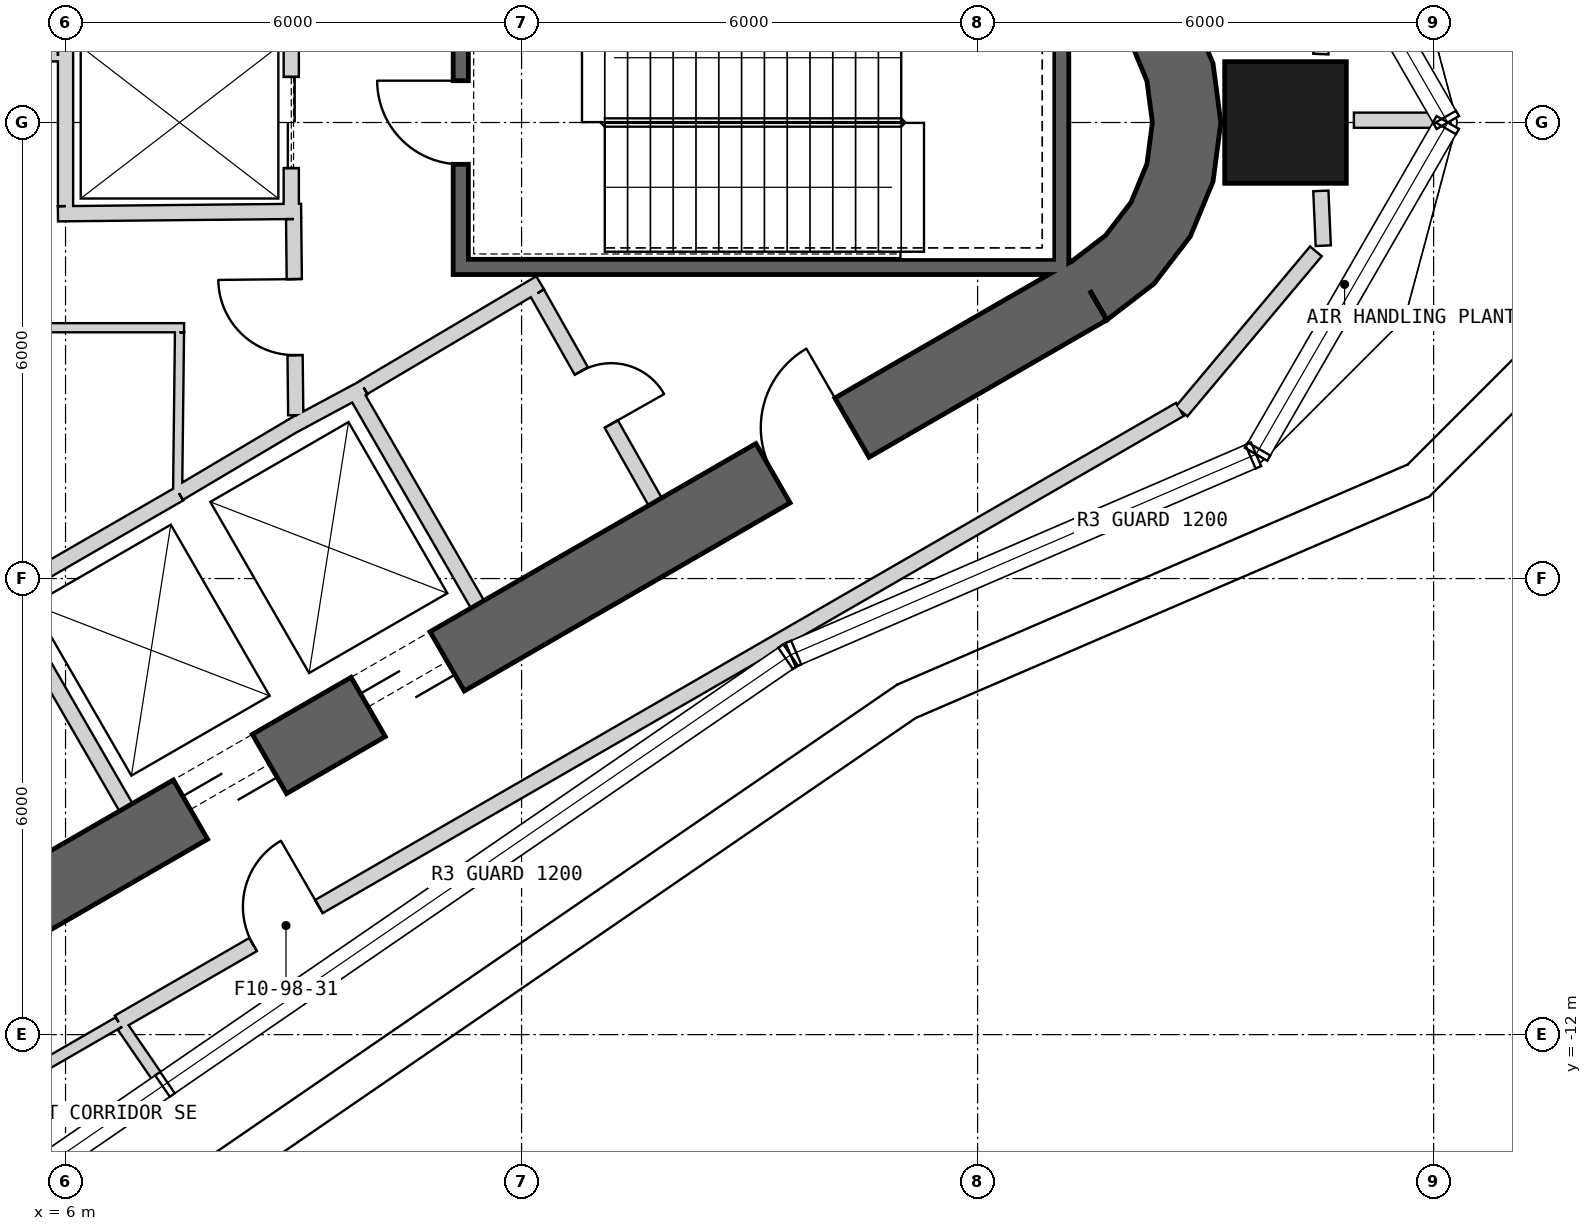
"""IFC4 building model, lengths in metres.
Left out: names, types, materials, properties, quantities, classifications, styles, units other than length and angle.
Written with IfcOpenShell. Run it as: python <this file> out.ifc"""

import sys

from ifc_helpers import new_model, si_unit, direction, frame, frame_2d, origin, origin_2d, place, context, subcontext, project, spatial, polyline, rectangle, outline, extrude, element, fill, save


model = new_model("IFC4")
c1 = context("Model", 3, precision=1e-05, world=origin(), true_north=direction((0.0, 1.0)))
c2 = subcontext(c1, "Body", "Model", "MODEL_VIEW")
j1 = project(units=[si_unit("LENGTHUNIT", "METRE"), si_unit("PLANEANGLEUNIT", "RADIAN")], contexts=[c1])
p1 = place(None, origin())
s1 = spatial("IfcSite", under=j1, at=p1, CompositionType="ELEMENT")
p2 = place(p1, origin())
s2 = spatial("IfcBuilding", under=s1, at=p2, CompositionType="ELEMENT")
p3 = place(p2, frame((0.0, 0.0, 435.3)))
s3 = spatial("IfcBuildingStorey", under=s2, at=p3, CompositionType="ELEMENT", Elevation=435.3)
p4 = place(p3, frame((22.051, 0.0, 0.0), z_axis=(0.0, 0.0, 1.0), x_axis=(1.0, 0.0, 0.0)))
e1 = element("IfcColumn", 1, at=p4, inside=s3, PredefinedType="COLUMN", context=c2, shape_type="SweptSolid", body=[
    extrude(rectangle(XDim=1.6, YDim=1.6, at=origin_2d()), origin(), (0.0, 0.0, 1.0), 5.0),
])
p5 = place(p3, frame((-7.825, -17.97, 0.0), z_axis=(0.0, 0.0, 1.0), x_axis=(0.866028369851, 0.499994862586, 0.0)))
e2 = element("IfcWall", 2, at=p5, inside=s3, PredefinedType="SHEAR", context=c2, shape_type="SweptSolid", body=[
    extrude(rectangle(XDim=31.523, YDim=0.9, at=frame_2d((15.762, 0.0))), origin(), (0.0, 0.0, 1.0), 5.0),
])
p6 = place(p5, frame((17.862, 0.0, 0.0)))
e3 = element("IfcOpeningElement", 3, at=p6, cuts=e2, PredefinedType="OPENING", context=c2, shape_type="SweptSolid", body=[
    extrude(rectangle(XDim=1.2, YDim=2.4, at=frame_2d((0.6, 1.2))), frame((0.0, 0.46, 0.0), z_axis=(0.0, -1.0, 0.0), x_axis=(1.0, 0.0, 0.0)), (0.0, 0.0, 1.0), 0.92),
])
p7 = place(p5, frame((20.562, 0.0, 0.0)))
e4 = element("IfcOpeningElement", 4, at=p7, cuts=e2, PredefinedType="OPENING", context=c2, shape_type="SweptSolid", body=[
    extrude(rectangle(XDim=1.2, YDim=2.4, at=frame_2d((0.6, 1.2))), frame((0.0, 0.46, 0.0), z_axis=(0.0, -1.0, 0.0), x_axis=(1.0, 0.0, 0.0)), (0.0, 0.0, 1.0), 0.92),
])
p8 = place(p5, frame((26.712, 0.0, 0.0)))
e5 = element("IfcOpeningElement", 5, at=p8, cuts=e2, PredefinedType="OPENING", context=c2, shape_type="SweptSolid", body=[
    extrude(rectangle(XDim=1.2, YDim=2.4, at=frame_2d((0.6, 1.2))), frame((0.0, 0.46, 0.0), z_axis=(0.0, -1.0, 0.0), x_axis=(1.0, 0.0, 0.0)), (0.0, 0.0, 1.0), 0.92),
])
p9 = place(p5, frame((3.612, 0.0, 0.0)))
e6 = element("IfcOpeningElement", 6, at=p9, cuts=e2, PredefinedType="OPENING", context=c2, shape_type="SweptSolid", body=[
    extrude(rectangle(XDim=1.2, YDim=2.4, at=frame_2d((0.6, 1.2))), frame((0.0, 0.46, 0.0), z_axis=(0.0, -1.0, 0.0), x_axis=(1.0, 0.0, 0.0)), (0.0, 0.0, 1.0), 0.92),
])
p10 = place(p3, origin())
e7 = element("IfcWall", 7, at=p10, inside=s3, PredefinedType="SHEAR", context=c2, shape_type="SweptSolid", body=[
    extrude(outline(polyline([(19.7, -2.598), (20.321, -2.121), (20.798, -1.5), (21.098, -0.777), (21.2, 0.0), (21.098, 0.777), (20.798, 1.5), (20.321, 2.121), (19.7, 2.598), (19.25, 1.819), (19.685, 1.485), (20.019, 1.05), (20.229, 0.543), (20.3, 0.0), (20.229, -0.543), (20.019, -1.05), (19.685, -1.485), (19.25, -1.819), (19.7, -2.598)])), origin(), (0.0, 0.0, 1.0), 5.0),
])
p11 = place(p3, frame((6.795, -9.01, 0.0), z_axis=(0.0, 0.0, 1.0), x_axis=(-0.499984717929, 0.866034226713, 0.0)))
e8 = element("IfcWall", 8, at=p11, inside=s3, PredefinedType="PLUMBINGWALL", context=c2, shape_type="SweptSolid", body=[
    extrude(rectangle(XDim=3.25, YDim=0.2, at=frame_2d((1.625, 0.0))), origin(), (0.0, 0.0, 1.0), 4.75),
])
p12 = place(p3, frame((5.159, -6.236, 0.0), z_axis=(0.0, 0.0, 1.0), x_axis=(0.866036505625, 0.499980770555, 0.0)))
e9 = element("IfcWall", 9, at=p12, inside=s3, PredefinedType="PLUMBINGWALL", context=c2, shape_type="SweptSolid", body=[
    extrude(rectangle(XDim=2.7, YDim=0.2, at=frame_2d((1.35, 0.0))), origin(), (0.0, 0.0, 1.0), 4.75),
])
p13 = place(p3, frame((9.795, -3.525, 0.0), z_axis=(0.0, 0.0, 1.0), x_axis=(0.499984717929, -0.866034226713, 0.0)))
e10 = element("IfcWall", 10, at=p13, inside=s3, PredefinedType="PLUMBINGWALL", context=c2, shape_type="SweptSolid", body=[
    extrude(rectangle(XDim=3.25, YDim=0.2, at=frame_2d((1.625, 0.0))), origin(), (0.0, 0.0, 1.0), 4.75),
])
p14 = place(p3, frame((8.974, -3.999, 0.0), z_axis=(0.0, 0.0, 1.0), x_axis=(0.880907015104, 0.473289373154, 0.0)))
e11 = element("IfcWall", 11, at=p14, inside=s3, PredefinedType="PLUMBINGWALL", context=c2, shape_type="SweptSolid", body=[
    extrude(rectangle(XDim=1.078, YDim=0.2, at=frame_2d((0.539, 0.0))), origin(), (0.0, 0.0, 1.0), 4.75),
])
p15 = place(p3, frame((7.493, -4.878, 0.0), z_axis=(0.0, 0.0, 1.0), x_axis=(0.859981807212, 0.510324691999, 0.0)))
e12 = element("IfcWall", 12, at=p15, inside=s3, PredefinedType="PLUMBINGWALL", context=c2, shape_type="SweptSolid", body=[
    extrude(rectangle(XDim=1.845, YDim=0.2, at=frame_2d((0.922, 0.0))), origin(), (0.0, 0.0, 1.0), 4.75),
])
p16 = place(p3, frame((19.1, -2.0, -0.25), z_axis=(0.0, 0.0, 1.0), x_axis=(0.0, 1.0, 0.0)))
e13 = element("IfcWall", 13, at=p16, inside=s3, PredefinedType="SHEAR", context=c2, shape_type="SweptSolid", body=[
    extrude(rectangle(XDim=3.8, YDim=0.2, at=frame_2d((1.9, 0.0))), origin(), (0.0, 0.0, 1.0), 5.0),
])
p17 = place(p3, frame((11.1, -1.9, -0.25), z_axis=(0.0, 0.0, 1.0), x_axis=(1.0, 0.0, 0.0)))
e14 = element("IfcWall", 14, at=p17, inside=s3, PredefinedType="SHEAR", context=c2, shape_type="SweptSolid", body=[
    extrude(rectangle(XDim=7.9, YDim=0.2, at=frame_2d((3.95, 0.0))), origin(), (0.0, 0.0, 1.0), 5.0),
])
p18 = place(p3, frame((11.2, -1.8, -0.25), z_axis=(0.0, 0.0, 1.0), x_axis=(0.0, 1.0, 0.0)))
e15 = element("IfcWall", 15, at=p18, inside=s3, PredefinedType="SHEAR", context=c2, shape_type="SweptSolid", body=[
    extrude(rectangle(XDim=3.6, YDim=0.2, at=frame_2d((1.8, 0.0))), origin(), (0.0, 0.0, 1.0), 5.0),
])
p19 = place(p18, frame((1.25, 0.0, 0.25)))
e16 = element("IfcOpeningElement", 16, at=p19, cuts=e15, PredefinedType="OPENING", context=c2, shape_type="SweptSolid", body=[
    extrude(rectangle(XDim=1.1, YDim=2.1, at=frame_2d((0.55, 1.05))), frame((0.0, 0.11, 0.0), z_axis=(0.0, -1.0, 0.0), x_axis=(1.0, 0.0, 0.0)), (0.0, 0.0, 1.0), 0.22),
])
p20 = place(p3, frame((8.97, 1.2, 0.0), z_axis=(0.0, 0.0, 1.0), x_axis=(0.0, -1.0, 0.0)))
e17 = element("IfcWall", 17, at=p20, inside=s3, PredefinedType="PLUMBINGWALL", context=c2, shape_type="SweptSolid", body=[
    extrude(rectangle(XDim=2.4, YDim=0.2, at=frame_2d((1.2, 0.0))), origin(), (0.0, 0.0, 1.0), 4.75),
])
p21 = place(p20, frame((0.6, 0.0, 0.0)))
e18 = element("IfcOpeningElement", 18, at=p21, cuts=e17, PredefinedType="OPENING", context=c2, shape_type="SweptSolid", body=[
    extrude(rectangle(XDim=1.2, YDim=2.4, at=frame_2d((0.6, 1.2))), frame((0.0, 0.11, 0.0), z_axis=(0.0, -1.0, 0.0), x_axis=(1.0, 0.0, 0.0)), (0.0, 0.0, 1.0), 0.22),
])
p22 = place(p3, frame((6.0, -1.1, 0.0), z_axis=(0.0, 0.0, 1.0), x_axis=(0.0, 1.0, 0.0)))
e19 = element("IfcWall", 19, at=p22, inside=s3, PredefinedType="PLUMBINGWALL", context=c2, shape_type="SweptSolid", body=[
    extrude(rectangle(XDim=2.2, YDim=0.2, at=frame_2d((1.1, 0.0))), origin(), (0.0, 0.0, 1.0), 4.75),
])
p23 = place(p3, frame((5.9, -1.201, 0.0), z_axis=(0.0, 0.0, 1.0), x_axis=(0.999950064753, 0.009993397809, 0.0)))
e20 = element("IfcWall", 20, at=p23, inside=s3, PredefinedType="PLUMBINGWALL", context=c2, shape_type="SweptSolid", body=[
    extrude(rectangle(XDim=3.2, YDim=0.2, at=frame_2d((1.6, 0.0))), origin(), (0.0, 0.0, 1.0), 4.75),
])
p24 = place(p3, frame((12.245, -2.109, 0.0), z_axis=(0.0, 0.0, 1.0), x_axis=(-0.860414880418, -0.509594185166, 0.0)))
e21 = element("IfcWall", 21, at=p24, inside=s3, PredefinedType="PARTITIONING", context=c2, shape_type="SweptSolid", body=[
    extrude(rectangle(XDim=2.7, YDim=0.2, at=frame_2d((1.35, 0.0))), origin(), (0.0, 0.0, 1.0), 4.75),
])
p25 = place(p3, frame((13.758, -4.99, 0.0), z_axis=(0.0, 0.0, 1.0), x_axis=(-0.491993409184, 0.87059892334, 0.0)))
e22 = element("IfcWall", 22, at=p25, inside=s3, PredefinedType="PARTITIONING", context=c2, shape_type="SweptSolid", body=[
    extrude(rectangle(XDim=3.15, YDim=0.2, at=frame_2d((1.575, 0.0))), origin(), (0.0, 0.0, 1.0), 4.75),
])
p26 = place(p25, frame((1.175, 0.0, 0.0)))
e23 = element("IfcOpeningElement", 23, at=p26, cuts=e22, PredefinedType="OPENING", context=c2, shape_type="SweptSolid", body=[
    extrude(rectangle(XDim=0.8, YDim=2.1, at=frame_2d((0.4, 1.05))), frame((0.0, 0.11, 0.0), z_axis=(0.0, -1.0, 0.0), x_axis=(1.0, 0.0, 0.0)), (0.0, 0.0, 1.0), 0.22),
])
p27 = place(p3, frame((9.029, -3.851, 0.0), z_axis=(0.0, 0.0, 1.0), x_axis=(-0.010783593937, 0.99994185536, 0.0)))
e24 = element("IfcWall", 24, at=p27, inside=s3, PredefinedType="PARTITIONING", context=c2, shape_type="SweptSolid", body=[
    extrude(rectangle(XDim=2.581, YDim=0.2, at=frame_2d((1.291, 0.0))), origin(), (0.0, 0.0, 1.0), 4.75),
])
p28 = place(p27, frame((0.791, 0.0, 0.0)))
e25 = element("IfcOpeningElement", 25, at=p28, cuts=e24, PredefinedType="OPENING", context=c2, shape_type="SweptSolid", body=[
    extrude(rectangle(XDim=1.0, YDim=2.1, at=frame_2d((0.5, 1.05))), frame((0.0, 0.11, 0.0), z_axis=(0.0, -1.0, 0.0), x_axis=(1.0, 0.0, 0.0)), (0.0, 0.0, 1.0), 0.22),
])
p29 = place(p3, frame((1.344, 0.849, 0.0), z_axis=(0.0, 0.0, 1.0), x_axis=(0.999978627641, 0.00653790957, 0.0)))
e26 = element("IfcWall", 26, at=p29, inside=s3, PredefinedType="PLUMBINGWALL", context=c2, shape_type="SweptSolid", body=[
    extrude(rectangle(XDim=4.556, YDim=0.15, at=frame_2d((2.278, 0.0))), origin(), (0.0, 0.0, 1.0), 4.75),
])
p30 = place(p29, frame((1.942, 0.0, 0.0)))
e27 = element("IfcOpeningElement", 27, at=p30, cuts=e26, PredefinedType="OPENING", context=c2, shape_type="SweptSolid", body=[
    extrude(rectangle(XDim=0.8, YDim=2.1, at=frame_2d((0.4, 1.05))), frame((0.0, 0.085, 0.0), z_axis=(0.0, -1.0, 0.0), x_axis=(1.0, 0.0, 0.0)), (0.0, 0.0, 1.0), 0.17),
])
p31 = place(p3, frame((7.56, -2.7, 0.0), z_axis=(0.0, 0.0, 1.0), x_axis=(-1.0, 0.0, 0.0)))
e28 = element("IfcWall", 28, at=p31, inside=s3, PredefinedType="PARTITIONING", context=c2, shape_type="SweptSolid", body=[
    extrude(rectangle(XDim=3.0, YDim=0.12, at=frame_2d((1.5, 0.0))), origin(), (0.0, 0.0, 1.0), 4.75),
])
p32 = place(p3, frame((7.475, -4.865, 0.0), z_axis=(0.0, 0.0, 1.0), x_axis=(0.011716133148, 0.999931363757, 0.0)))
e29 = element("IfcWall", 29, at=p32, inside=s3, PredefinedType="PARTITIONING", context=c2, shape_type="SweptSolid", body=[
    extrude(rectangle(XDim=2.105, YDim=0.12, at=frame_2d((1.052, 0.0))), origin(), (0.0, 0.0, 1.0), 4.75),
])
p33 = place(p3, frame((22.516, 0.9, 0.0), z_axis=(0.0, 0.0, 1.0), x_axis=(0.044289222506, 0.99901875096, 0.0)))
e30 = element("IfcWall", 30, at=p33, inside=s3, PredefinedType="PARTITIONING", context=c2, shape_type="SweptSolid", body=[
    extrude(rectangle(XDim=0.535, YDim=0.2, at=frame_2d((0.267, 0.0))), origin(), (0.0, 0.0, 1.0), 4.75),
])
p34 = place(p3, frame((22.951, 0.03, 0.0), z_axis=(0.0, 0.0, 1.0), x_axis=(1.0, 0.0, 0.0)))
e31 = element("IfcWall", 31, at=p34, inside=s3, PredefinedType="PARTITIONING", context=c2, shape_type="SweptSolid", body=[
    extrude(rectangle(XDim=1.098, YDim=0.2, at=frame_2d((0.549, 0.0))), origin(), (0.0, 0.0, 1.0), 3.93),
])
p35 = place(p3, frame((-7.213, -19.868, 0.0), z_axis=(0.0, 0.0, 1.0), x_axis=(0.866026120779, 0.499998758127, 0.0)))
e32 = element("IfcWall", 32, at=p35, inside=s3, PredefinedType="PLUMBINGWALL", context=c2, shape_type="SweptSolid", body=[
    extrude(rectangle(XDim=16.062, YDim=0.15, at=frame_2d((8.031, 0.0))), origin(), (0.0, 0.0, 1.0), 4.75),
])
p36 = place(p35, frame((7.675, 0.0, 0.0)))
e33 = element("IfcOpeningElement", 33, at=p36, cuts=e32, PredefinedType="OPENING", context=c2, shape_type="SweptSolid", body=[
    extrude(rectangle(XDim=0.8, YDim=2.1, at=frame_2d((0.4, 1.05))), frame((0.0, 0.085, 0.0), z_axis=(0.0, -1.0, 0.0), x_axis=(1.0, 0.0, 0.0)), (0.0, 0.0, 1.0), 0.17),
])
p37 = place(p3, frame((22.548, -1.621, 0.0), z_axis=(0.0, 0.0, 1.0), x_axis=(-0.043980430429, 0.999032392738, 0.0)))
e34 = element("IfcWall", 34, at=p37, inside=s3, PredefinedType="PARTITIONING", context=c2, shape_type="SweptSolid", body=[
    extrude(rectangle(XDim=0.722, YDim=0.2, at=frame_2d((0.361, 0.0))), origin(), (0.0, 0.0, 1.0), 4.75),
])
p38 = place(p3, frame((20.684, -3.802, 0.0), z_axis=(0.0, 0.0, 1.0), x_axis=(0.642800550542, 0.766033584265, 0.0)))
e35 = element("IfcWall", 35, at=p38, inside=s3, PredefinedType="PARTITIONING", context=c2, shape_type="SweptSolid", body=[
    extrude(rectangle(XDim=2.75, YDim=0.2, at=frame_2d((1.375, 0.0))), origin(), (0.0, 0.0, 1.0), 4.75),
])
p39 = place(p3, frame((6.698, -11.837, 0.0), z_axis=(0.0, 0.0, 1.0), x_axis=(0.866022444471, 0.500005125646, 0.0)))
e36 = element("IfcWall", 36, at=p39, inside=s3, PredefinedType="PARTITIONING", context=c2, shape_type="SweptSolid", body=[
    extrude(rectangle(XDim=16.124, YDim=0.2, at=frame_2d((8.062, 0.0))), origin(), (0.0, 0.0, 1.0), 4.75),
])
p40 = place(p39, frame((2.044, 0.0, 0.0)))
e37 = element("IfcOpeningElement", 37, at=p40, cuts=e36, PredefinedType="OPENING", context=c2, shape_type="SweptSolid", body=[
    extrude(rectangle(XDim=1.0, YDim=2.1, at=frame_2d((0.5, 1.05))), frame((0.0, 0.11, 0.0), z_axis=(0.0, -1.0, 0.0), x_axis=(1.0, 0.0, 0.0)), (0.0, 0.0, 1.0), 0.22),
])
p41 = place(p3, frame((7.213, -12.568, 0.0), z_axis=(0.0, 0.0, 1.0), x_axis=(-0.565933909506, 0.824450611056, 0.0)))
e38 = element("IfcWall", 38, at=p41, inside=s3, PredefinedType="PLUMBINGWALL", context=c2, shape_type="SweptSolid", body=[
    extrude(rectangle(XDim=0.819, YDim=0.15, at=frame_2d((0.409, 0.0))), origin(), (0.0, 0.0, 1.0), 4.75),
])
p42 = place(p19, origin())
e39 = element("IfcDoor", 39, at=p42, inside=s3, OperationType="SINGLE_SWING_RIGHT", PredefinedType="USERDEFINED", context=c2, shape_type="SweptSolid", body=[
    extrude(rectangle(XDim=1.1, YDim=2.1, at=frame_2d((0.55, 1.05))), frame((0.0, 0.025, 0.0), z_axis=(0.0, -1.0, 0.0), x_axis=(1.0, 0.0, 0.0)), (0.0, 0.0, 1.0), 0.05),
])
fill(e16, e39)
p43 = place(p28, origin())
e40 = element("IfcDoor", 40, at=p43, inside=s3, OperationType="SINGLE_SWING_RIGHT", PredefinedType="USERDEFINED", context=c2, shape_type="SweptSolid", body=[
    extrude(rectangle(XDim=1.0, YDim=2.1, at=frame_2d((0.5, 1.05))), frame((0.0, 0.025, 0.0), z_axis=(0.0, -1.0, 0.0), x_axis=(1.0, 0.0, 0.0)), (0.0, 0.0, 1.0), 0.05),
])
fill(e25, e40)
p44 = place(p21, origin())
e41 = element("IfcDoor", 41, at=p44, inside=s3, OperationType="SLIDING_TO_LEFT", PredefinedType="USERDEFINED", context=c2, shape_type="SweptSolid", body=[
    extrude(rectangle(XDim=1.2, YDim=2.4, at=frame_2d((0.6, 1.2))), frame((0.0, 0.025, 0.0), z_axis=(0.0, -1.0, 0.0), x_axis=(1.0, 0.0, 0.0)), (0.0, 0.0, 1.0), 0.05),
])
fill(e18, e41)
p45 = place(p26, origin())
e42 = element("IfcDoor", 42, at=p45, inside=s3, OperationType="SINGLE_SWING_LEFT", PredefinedType="USERDEFINED", context=c2, shape_type="SweptSolid", body=[
    extrude(rectangle(XDim=0.8, YDim=2.1, at=frame_2d((0.4, 1.05))), frame((0.0, 0.025, 0.0), z_axis=(0.0, -1.0, 0.0), x_axis=(1.0, 0.0, 0.0)), (0.0, 0.0, 1.0), 0.05),
])
fill(e23, e42)
p46 = place(p40, origin())
e43 = element("IfcDoor", 43, at=p46, inside=s3, OperationType="SINGLE_SWING_RIGHT", PredefinedType="USERDEFINED", context=c2, shape_type="SweptSolid", body=[
    extrude(rectangle(XDim=1.0, YDim=2.1, at=frame_2d((0.5, 1.05))), frame((0.0, 0.025, 0.0), z_axis=(0.0, -1.0, 0.0), x_axis=(1.0, 0.0, 0.0)), (0.0, 0.0, 1.0), 0.05),
])
fill(e37, e43)
p47 = place(p6, origin())
e44 = element("IfcDoor", 44, at=p47, inside=s3, OperationType="SLIDING_TO_LEFT", PredefinedType="USERDEFINED", context=c2, shape_type="SweptSolid", body=[
    extrude(rectangle(XDim=1.2, YDim=2.4, at=frame_2d((0.6, 1.2))), frame((0.0, 0.025, 0.0), z_axis=(0.0, -1.0, 0.0), x_axis=(1.0, 0.0, 0.0)), (0.0, 0.0, 1.0), 0.05),
])
fill(e3, e44)
p48 = place(p7, origin())
e45 = element("IfcDoor", 45, at=p48, inside=s3, OperationType="SLIDING_TO_LEFT", PredefinedType="USERDEFINED", context=c2, shape_type="SweptSolid", body=[
    extrude(rectangle(XDim=1.2, YDim=2.4, at=frame_2d((0.6, 1.2))), frame((0.0, 0.025, 0.0), z_axis=(0.0, -1.0, 0.0), x_axis=(1.0, 0.0, 0.0)), (0.0, 0.0, 1.0), 0.05),
])
fill(e4, e45)
p49 = place(p8, origin())
e46 = element("IfcDoor", 46, at=p49, inside=s3, OperationType="SINGLE_SWING_RIGHT", PredefinedType="USERDEFINED", context=c2, shape_type="SweptSolid", body=[
    extrude(rectangle(XDim=1.2, YDim=2.4, at=frame_2d((0.6, 1.2))), frame((0.0, 0.025, 0.0), z_axis=(0.0, -1.0, 0.0), x_axis=(1.0, 0.0, 0.0)), (0.0, 0.0, 1.0), 0.05),
])
fill(e5, e46)
save(model, sys.argv[1])
